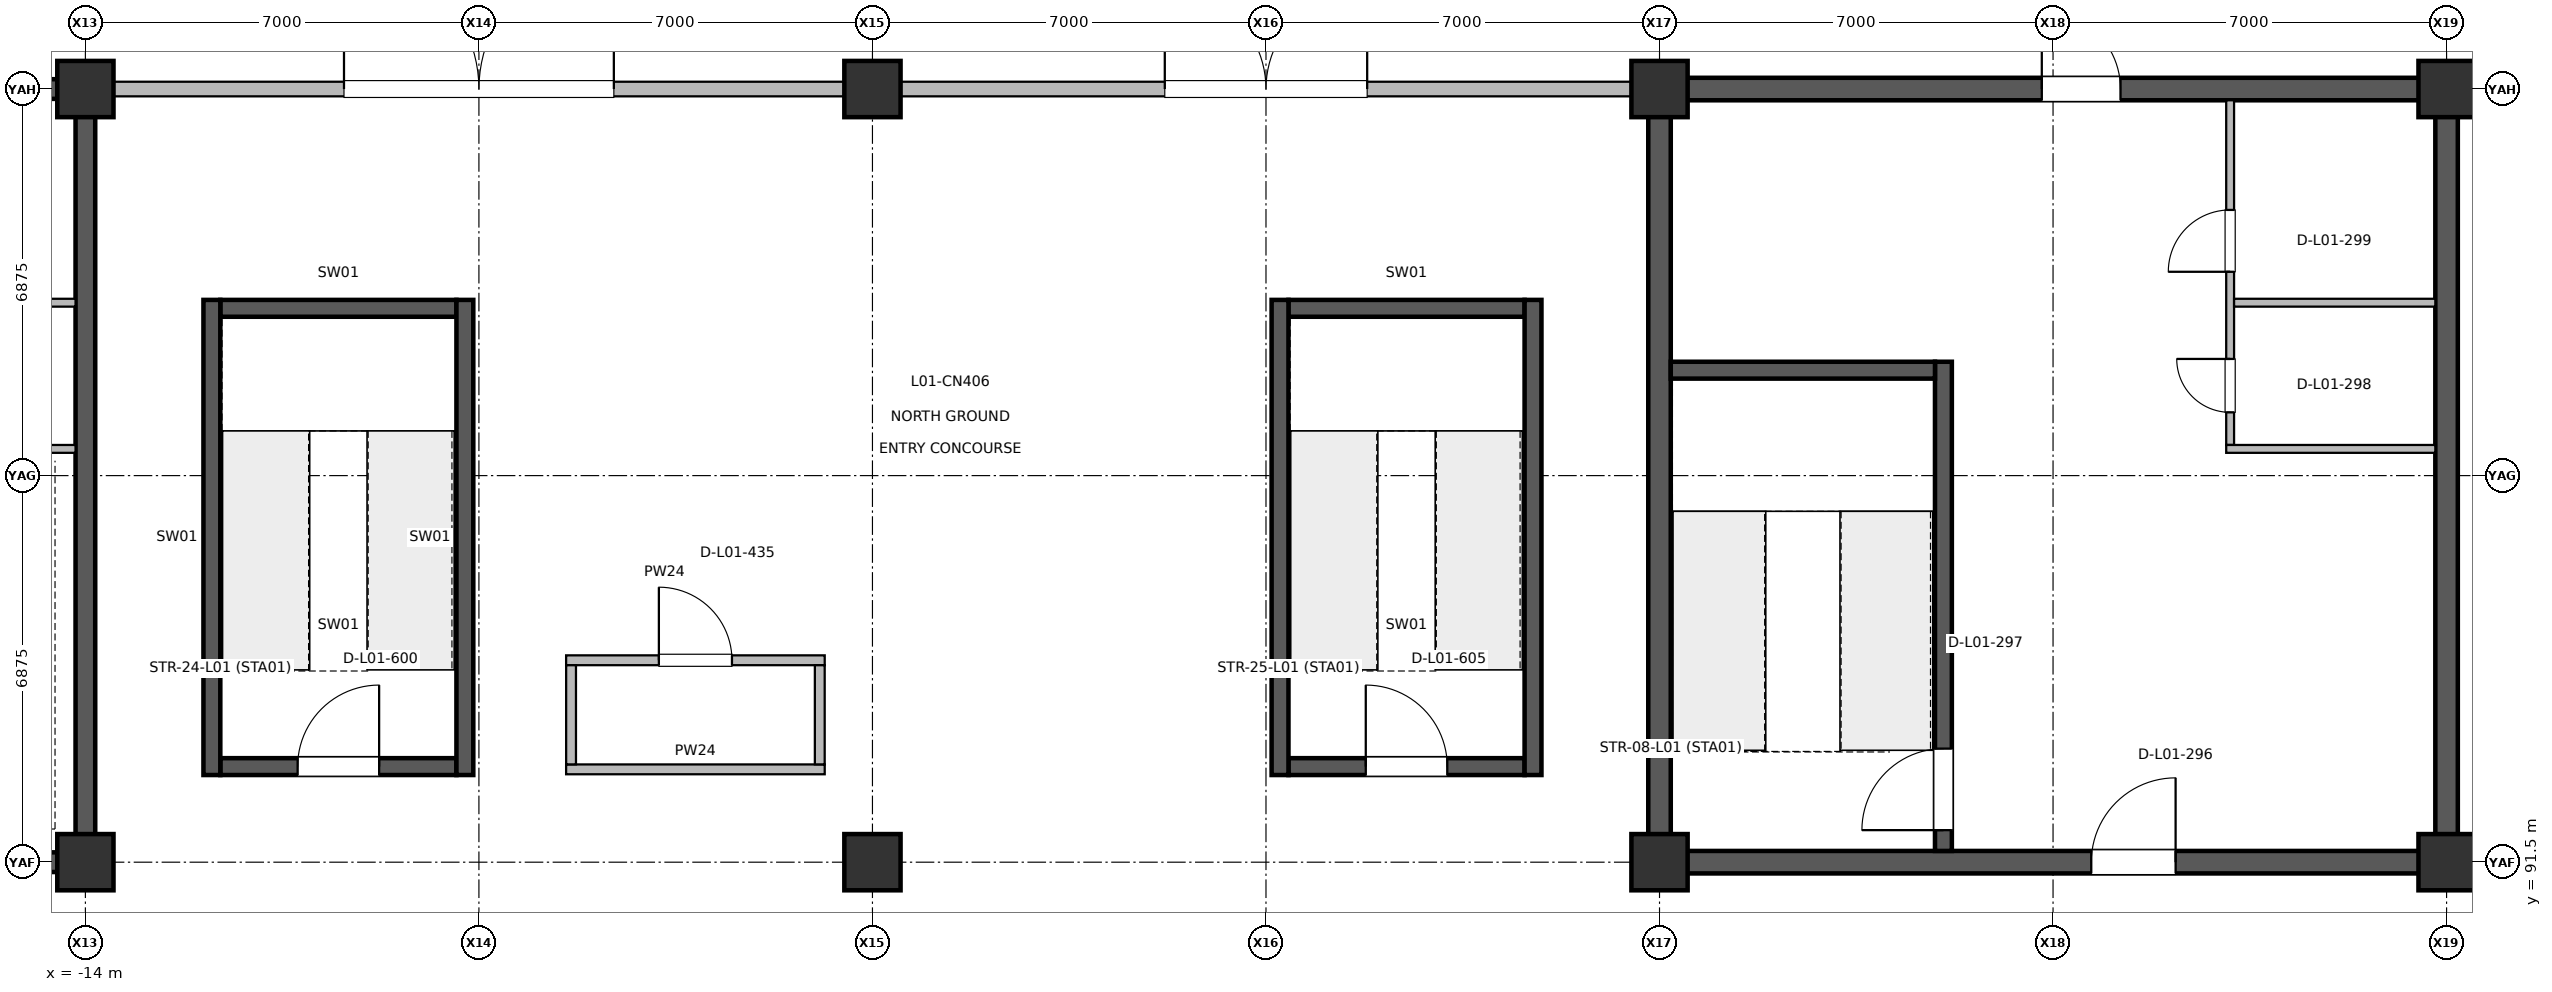
"""IFC4 building model, lengths in metres.
Left out: names, types, materials, properties, quantities, classifications, styles, units other than length and angle.
Written with IfcOpenShell. Run it as: python <this file> out.ifc"""

import sys

from ifc_helpers import new_model, si_unit, direction, frame, frame_2d, origin, origin_2d, place, context, subcontext, project, spatial, rectangle, circle, extrude, element, fill, save


model = new_model("IFC4")
c1 = context("Model", 3, precision=1e-05, world=origin(), true_north=direction((0.0, 1.0)))
c2 = subcontext(c1, "Body", "Model", "MODEL_VIEW")
j1 = project(units=[si_unit("LENGTHUNIT", "METRE"), si_unit("PLANEANGLEUNIT", "RADIAN")], contexts=[c1])
p1 = place(None, origin())
s1 = spatial("IfcSite", under=j1, at=p1, CompositionType="ELEMENT")
p2 = place(p1, origin())
s2 = spatial("IfcBuilding", under=s1, at=p2, CompositionType="ELEMENT")
p3 = place(p2, origin())
s3 = spatial("IfcBuildingStorey", under=s2, at=p3, CompositionType="ELEMENT", Elevation=0.0)
for number, where, z_axis, x_axis in (
    (1, (-14.0, 91.5, 0.0), (0.0, 0.0, 1.0), (1.0, 0.0, 0.0)),
    (2, (-14.0, 105.25, 0.0), (0.0, 0.0, 1.0), (1.0, 0.0, 0.0)),
    (3, (0.0, 91.5, 0.0), (0.0, 0.0, 1.0), (1.0, 0.0, 0.0)),
    (4, (0.0, 105.25, 0.0), (0.0, 0.0, 1.0), (1.0, 0.0, 0.0)),
    (5, (14.0, 91.5, 0.0), (0.0, 0.0, 1.0), (1.0, 0.0, 0.0)),
    (6, (14.0, 105.25, 0.0), (0.0, 0.0, 1.0), (1.0, 0.0, 0.0)),
    (7, (28.0, 91.5, 0.0), (0.0, 0.0, 1.0), (1.0, 0.0, 0.0)),
    (8, (28.0, 105.25, 0.0), (0.0, 0.0, 1.0), (1.0, 0.0, 0.0)),
):
    element("IfcColumn", number, at=place(p3, frame(where, z_axis=z_axis, x_axis=x_axis)), inside=s3, PredefinedType="COLUMN", context=c2, shape_type="SweptSolid", body=[
        extrude(circle(Radius=0.5, at=origin_2d()), origin(), (0.0, 0.0, 1.0), 5.998),
    ])
p4 = place(p3, frame((-14.0, 91.675, 0.0), z_axis=(0.0, 0.0, 1.0), x_axis=(0.0, 1.0, 0.0)))
e9 = element("IfcWall", 9, at=p4, inside=s3, PredefinedType="SHEAR", context=c2, shape_type="SweptSolid", body=[
    extrude(rectangle(XDim=13.4, YDim=0.35, at=frame_2d((6.7, 0.0))), origin(), (0.0, 0.0, 1.0), 5.78),
])
p5 = place(p3, frame((-27.825, 91.5, 0.0), z_axis=(0.0, 0.0, 1.0), x_axis=(1.0, 0.0, 0.0)))
e10 = element("IfcWall", 10, at=p5, inside=s3, PredefinedType="SHEAR", context=c2, shape_type="SweptSolid", body=[
    extrude(rectangle(XDim=13.65, YDim=0.35, at=frame_2d((6.825, 0.0))), origin(), (0.0, 0.0, 1.0), 5.78),
])
p6 = place(p5, frame((7.507, 0.0, 0.0)))
e11 = element("IfcOpeningElement", 11, at=p6, cuts=e10, PredefinedType="OPENING", context=c2, shape_type="SweptSolid", body=[
    extrude(rectangle(XDim=1.5, YDim=2.2, at=frame_2d((0.75, 1.1))), frame((0.0, 0.185, 0.0), z_axis=(0.0, -1.0, 0.0), x_axis=(1.0, 0.0, 0.0)), (0.0, 0.0, 1.0), 0.37),
])
p7 = place(p3, frame((-27.825, 105.25, 0.0), z_axis=(0.0, 0.0, 1.0), x_axis=(1.0, 0.0, 0.0)))
e12 = element("IfcWall", 12, at=p7, inside=s3, PredefinedType="SHEAR", context=c2, shape_type="SweptSolid", body=[
    extrude(rectangle(XDim=13.65, YDim=0.35, at=frame_2d((6.825, 0.0))), origin(), (0.0, 0.0, 1.0), 5.78),
])
p8 = place(p7, frame((6.6, 0.0, 0.0)))
e13 = element("IfcOpeningElement", 13, at=p8, cuts=e12, PredefinedType="OPENING", context=c2, shape_type="SweptSolid", body=[
    extrude(rectangle(XDim=1.4, YDim=2.2, at=frame_2d((0.7, 1.1))), frame((0.0, 0.185, 0.0), z_axis=(0.0, -1.0, 0.0), x_axis=(1.0, 0.0, 0.0)), (0.0, 0.0, 1.0), 0.37),
])
for number, where, z_axis, x_axis in (
    (14, (14.0, 91.7, 0.0), (0.0, 0.0, 1.0), (0.0, 1.0, 0.0)),
    (15, (28.0, 91.7, 0.0), (0.0, 0.0, 1.0), (0.0, 1.0, 0.0)),
):
    element("IfcWall", number, at=place(p3, frame(where, z_axis=z_axis, x_axis=x_axis)), inside=s3, PredefinedType="SHEAR", context=c2, shape_type="SweptSolid", body=[
        extrude(rectangle(XDim=13.35, YDim=0.4, at=frame_2d((6.675, 0.0))), origin(), (0.0, 0.0, 1.0), 5.78),
    ])
p9 = place(p3, frame((14.2, 91.5, 0.0), z_axis=(0.0, 0.0, 1.0), x_axis=(1.0, 0.0, 0.0)))
e16 = element("IfcWall", 16, at=p9, inside=s3, PredefinedType="SHEAR", context=c2, shape_type="SweptSolid", body=[
    extrude(rectangle(XDim=13.6, YDim=0.4, at=frame_2d((6.8, 0.0))), origin(), (0.0, 0.0, 1.0), 5.78),
])
p10 = place(p9, frame((7.48, 0.0, 0.0)))
e17 = element("IfcOpeningElement", 17, at=p10, cuts=e16, PredefinedType="OPENING", context=c2, shape_type="SweptSolid", body=[
    extrude(rectangle(XDim=1.5, YDim=2.2, at=frame_2d((0.75, 1.1))), frame((0.0, 0.21, 0.0), z_axis=(0.0, -1.0, 0.0), x_axis=(1.0, 0.0, 0.0)), (0.0, 0.0, 1.0), 0.42),
])
p11 = place(p3, frame((14.2, 105.25, 0.0), z_axis=(0.0, 0.0, 1.0), x_axis=(1.0, 0.0, 0.0)))
e18 = element("IfcWall", 18, at=p11, inside=s3, PredefinedType="SHEAR", context=c2, shape_type="SweptSolid", body=[
    extrude(rectangle(XDim=13.6, YDim=0.4, at=frame_2d((6.8, 0.0))), origin(), (0.0, 0.0, 1.0), 5.78),
])
p12 = place(p11, frame((6.6, 0.0, 0.0)))
e19 = element("IfcOpeningElement", 19, at=p12, cuts=e18, PredefinedType="OPENING", context=c2, shape_type="SweptSolid", body=[
    extrude(rectangle(XDim=1.4, YDim=2.2, at=frame_2d((0.7, 1.1))), frame((0.0, 0.21, 0.0), z_axis=(0.0, -1.0, 0.0), x_axis=(1.0, 0.0, 0.0)), (0.0, 0.0, 1.0), 0.42),
])
p13 = place(p3, frame((-13.52, 105.25, 0.0), z_axis=(0.0, 0.0, 1.0), x_axis=(1.0, 0.0, 0.0)))
e20 = element("IfcWall", 20, at=p13, inside=s3, PredefinedType="SOLIDWALL", context=c2, shape_type="SweptSolid", body=[
    extrude(rectangle(XDim=13.04, YDim=0.26, at=frame_2d((6.52, 0.0))), origin(), (0.0, 0.0, 1.0), 4.655),
])
p14 = place(p13, frame((4.12, 0.0, 0.0)))
e21 = element("IfcOpeningElement", 21, at=p14, cuts=e20, PredefinedType="OPENING", context=c2, shape_type="SweptSolid", body=[
    extrude(rectangle(XDim=4.8, YDim=3.8, at=frame_2d((2.4, 1.9))), frame((0.0, 0.14, 0.0), z_axis=(0.0, -1.0, 0.0), x_axis=(1.0, 0.0, 0.0)), (0.0, 0.0, 1.0), 0.28),
])
p15 = place(p3, frame((0.48, 105.25, 0.0), z_axis=(0.0, 0.0, 1.0), x_axis=(1.0, 0.0, 0.0)))
e22 = element("IfcWall", 22, at=p15, inside=s3, PredefinedType="SOLIDWALL", context=c2, shape_type="SweptSolid", body=[
    extrude(rectangle(XDim=13.04, YDim=0.26, at=frame_2d((6.52, 0.0))), origin(), (0.0, 0.0, 1.0), 4.655),
])
p16 = place(p15, frame((4.72, 0.0, 0.0)))
e23 = element("IfcOpeningElement", 23, at=p16, cuts=e22, PredefinedType="OPENING", context=c2, shape_type="SweptSolid", body=[
    extrude(rectangle(XDim=3.6, YDim=2.75, at=frame_2d((1.8, 1.375))), frame((0.0, 0.14, 0.0), z_axis=(0.0, -1.0, 0.0), x_axis=(1.0, 0.0, 0.0)), (0.0, 0.0, 1.0), 0.28),
])
p17 = place(p3, frame((19.05, 91.7, 0.0), z_axis=(0.0, 0.0, 1.0), x_axis=(0.0, 1.0, 0.0)))
e24 = element("IfcWall", 24, at=p17, inside=s3, PredefinedType="SHEAR", context=c2, shape_type="SweptSolid", body=[
    extrude(rectangle(XDim=8.7, YDim=0.3, at=frame_2d((4.35, 0.0))), origin(), (0.0, 0.0, 1.0), 5.78),
])
p18 = place(p17, frame((0.37, 0.0, 0.0)))
e25 = element("IfcOpeningElement", 25, at=p18, cuts=e24, PredefinedType="OPENING", context=c2, shape_type="SweptSolid", body=[
    extrude(rectangle(XDim=1.45, YDim=2.2, at=frame_2d((0.725, 1.1))), frame((0.0, 0.16, 0.0), z_axis=(0.0, -1.0, 0.0), x_axis=(1.0, 0.0, 0.0)), (0.0, 0.0, 1.0), 0.32),
])
p19 = place(p3, frame((24.15, 98.92, 0.0), z_axis=(0.0, 0.0, 1.0), x_axis=(0.0, 1.0, 0.0)))
e26 = element("IfcWall", 26, at=p19, inside=s3, PredefinedType="PARTITIONING", context=c2, shape_type="SweptSolid", body=[
    extrude(rectangle(XDim=6.13, YDim=0.14, at=frame_2d((3.065, 0.0))), origin(), (0.0, 0.0, 1.0), 5.02),
])
p20 = place(p19, frame((0.58, 0.0, 0.0)))
e27 = element("IfcOpeningElement", 27, at=p20, cuts=e26, PredefinedType="OPENING", context=c2, shape_type="SweptSolid", body=[
    extrude(rectangle(XDim=0.95, YDim=2.15, at=frame_2d((0.475, 1.075))), frame((0.0, 0.08, 0.0), z_axis=(0.0, -1.0, 0.0), x_axis=(1.0, 0.0, 0.0)), (0.0, 0.0, 1.0), 0.16),
])
p21 = place(p19, frame((3.08, 0.0, 0.0)))
e28 = element("IfcOpeningElement", 28, at=p21, cuts=e26, PredefinedType="OPENING", context=c2, shape_type="SweptSolid", body=[
    extrude(rectangle(XDim=1.1, YDim=2.15, at=frame_2d((0.55, 1.075))), frame((0.0, 0.08, 0.0), z_axis=(0.0, -1.0, 0.0), x_axis=(1.0, 0.0, 0.0)), (0.0, 0.0, 1.0), 0.16),
])
p22 = place(p3, frame((-5.449, 95.091, 0.0), z_axis=(0.0, 0.0, 1.0), x_axis=(1.0, 0.0, 0.0)))
e29 = element("IfcWall", 29, at=p22, inside=s3, PredefinedType="PARTITIONING", context=c2, shape_type="SweptSolid", body=[
    extrude(rectangle(XDim=4.6, YDim=0.175, at=frame_2d((2.3, 0.0))), origin(), (0.0, 0.0, 1.0), 5.02),
])
p23 = place(p22, frame((1.65, 0.0, 0.0)))
e30 = element("IfcOpeningElement", 30, at=p23, cuts=e29, PredefinedType="OPENING", context=c2, shape_type="SweptSolid", body=[
    extrude(rectangle(XDim=1.3, YDim=2.3, at=frame_2d((0.65, 1.15))), frame((0.0, 0.097, 0.0), z_axis=(0.0, -1.0, 0.0), x_axis=(1.0, 0.0, 0.0)), (0.0, 0.0, 1.0), 0.195),
])
p24 = place(p3, frame((-17.92, 98.85, 0.0), z_axis=(0.0, 0.0, 1.0), x_axis=(1.0, 0.0, 0.0)))
e31 = element("IfcWall", 31, at=p24, inside=s3, PredefinedType="PARTITIONING", context=c2, shape_type="SweptSolid", body=[
    extrude(rectangle(XDim=3.745, YDim=0.14, at=frame_2d((1.873, 0.0))), origin(), (0.0, 0.0, 1.0), 5.02),
])
p25 = place(p3, frame((-17.78, 101.45, 0.0), z_axis=(0.0, 0.0, 1.0), x_axis=(1.0, 0.0, 0.0)))
e32 = element("IfcWall", 32, at=p25, inside=s3, PredefinedType="PARTITIONING", context=c2, shape_type="SweptSolid", body=[
    extrude(rectangle(XDim=3.605, YDim=0.14, at=frame_2d((1.802, 0.0))), origin(), (0.0, 0.0, 1.0), 5.02),
])
p26 = place(p3, frame((24.08, 98.85, 0.0), z_axis=(0.0, 0.0, 1.0), x_axis=(1.0, 0.0, 0.0)))
e33 = element("IfcWall", 33, at=p26, inside=s3, PredefinedType="PARTITIONING", context=c2, shape_type="SweptSolid", body=[
    extrude(rectangle(XDim=3.72, YDim=0.14, at=frame_2d((1.86, 0.0))), origin(), (0.0, 0.0, 1.0), 5.02),
])
p27 = place(p3, frame((24.22, 101.45, 0.0), z_axis=(0.0, 0.0, 1.0), x_axis=(1.0, 0.0, 0.0)))
e34 = element("IfcWall", 34, at=p27, inside=s3, PredefinedType="PARTITIONING", context=c2, shape_type="SweptSolid", body=[
    extrude(rectangle(XDim=3.58, YDim=0.14, at=frame_2d((1.79, 0.0))), origin(), (0.0, 0.0, 1.0), 5.02),
])
p28 = place(p3, frame((-5.449, 93.151, 0.0), z_axis=(0.0, 0.0, 1.0), x_axis=(1.0, 0.0, 0.0)))
e35 = element("IfcWall", 35, at=p28, inside=s3, PredefinedType="PARTITIONING", context=c2, shape_type="SweptSolid", body=[
    extrude(rectangle(XDim=4.6, YDim=0.175, at=frame_2d((2.3, 0.0))), origin(), (0.0, 0.0, 1.0), 5.02),
])
for number, where, z_axis, x_axis in (
    (36, (-5.361, 93.239, 0.0), (0.0, 0.0, 1.0), (0.0, 1.0, 0.0)),
    (37, (-0.937, 93.239, 0.0), (0.0, 0.0, 1.0), (0.0, 1.0, 0.0)),
):
    element("IfcWall", number, at=place(p3, frame(where, z_axis=z_axis, x_axis=x_axis)), inside=s3, PredefinedType="PARTITIONING", context=c2, shape_type="SweptSolid", body=[
        extrude(rectangle(XDim=1.764, YDim=0.175, at=frame_2d((0.882, 0.0))), origin(), (0.0, 0.0, 1.0), 5.02),
    ])
p29 = place(p3, frame((14.2, 100.25, 0.0), z_axis=(0.0, 0.0, 1.0), x_axis=(1.0, 0.0, 0.0)))
e38 = element("IfcWall", 38, at=p29, inside=s3, PredefinedType="SHEAR", context=c2, shape_type="SweptSolid", body=[
    extrude(rectangle(XDim=4.7, YDim=0.3, at=frame_2d((2.35, 0.0))), origin(), (0.0, 0.0, 1.0), 5.78),
])
p30 = place(p3, frame((-11.6, 93.2, 0.0), z_axis=(0.0, 0.0, 1.0), x_axis=(1.0, 0.0, 0.0)))
e39 = element("IfcWall", 39, at=p30, inside=s3, PredefinedType="SHEAR", context=c2, shape_type="SweptSolid", body=[
    extrude(rectangle(XDim=4.2, YDim=0.3, at=frame_2d((2.1, 0.0))), origin(), (0.0, 0.0, 1.0), 5.78),
])
p31 = place(p30, frame((1.375, 0.0, 0.0)))
e40 = element("IfcOpeningElement", 40, at=p31, cuts=e39, PredefinedType="OPENING", context=c2, shape_type="SweptSolid", body=[
    extrude(rectangle(XDim=1.45, YDim=2.2, at=frame_2d((0.725, 1.1))), frame((0.0, 0.16, 0.0), z_axis=(0.0, -1.0, 0.0), x_axis=(1.0, 0.0, 0.0)), (0.0, 0.0, 1.0), 0.32),
])
p32 = place(p3, frame((-11.6, 101.35, 0.0), z_axis=(0.0, 0.0, 1.0), x_axis=(1.0, 0.0, 0.0)))
e41 = element("IfcWall", 41, at=p32, inside=s3, PredefinedType="SHEAR", context=c2, shape_type="SweptSolid", body=[
    extrude(rectangle(XDim=4.2, YDim=0.3, at=frame_2d((2.1, 0.0))), origin(), (0.0, 0.0, 1.0), 5.78),
])
for number, where, z_axis, x_axis in (
    (42, (-11.75, 93.05, 0.0), (0.0, 0.0, 1.0), (0.0, 1.0, 0.0)),
    (43, (-7.25, 93.05, 0.0), (0.0, 0.0, 1.0), (0.0, 1.0, 0.0)),
):
    element("IfcWall", number, at=place(p3, frame(where, z_axis=z_axis, x_axis=x_axis)), inside=s3, PredefinedType="SHEAR", context=c2, shape_type="SweptSolid", body=[
        extrude(rectangle(XDim=8.45, YDim=0.3, at=frame_2d((4.225, 0.0))), origin(), (0.0, 0.0, 1.0), 5.78),
    ])
p33 = place(p3, frame((7.4, 93.2, 0.0), z_axis=(0.0, 0.0, 1.0), x_axis=(1.0, 0.0, 0.0)))
e44 = element("IfcWall", 44, at=p33, inside=s3, PredefinedType="SHEAR", context=c2, shape_type="SweptSolid", body=[
    extrude(rectangle(XDim=4.2, YDim=0.3, at=frame_2d((2.1, 0.0))), origin(), (0.0, 0.0, 1.0), 5.78),
])
p34 = place(p33, frame((1.375, 0.0, 0.0)))
e45 = element("IfcOpeningElement", 45, at=p34, cuts=e44, PredefinedType="OPENING", context=c2, shape_type="SweptSolid", body=[
    extrude(rectangle(XDim=1.45, YDim=2.2, at=frame_2d((0.725, 1.1))), frame((0.0, 0.16, 0.0), z_axis=(0.0, -1.0, 0.0), x_axis=(1.0, 0.0, 0.0)), (0.0, 0.0, 1.0), 0.32),
])
p35 = place(p3, frame((7.4, 101.35, 0.0), z_axis=(0.0, 0.0, 1.0), x_axis=(1.0, 0.0, 0.0)))
e46 = element("IfcWall", 46, at=p35, inside=s3, PredefinedType="SHEAR", context=c2, shape_type="SweptSolid", body=[
    extrude(rectangle(XDim=4.2, YDim=0.3, at=frame_2d((2.1, 0.0))), origin(), (0.0, 0.0, 1.0), 5.78),
])
for number, where, z_axis, x_axis in (
    (47, (7.25, 93.05, 0.0), (0.0, 0.0, 1.0), (0.0, 1.0, 0.0)),
    (48, (11.75, 93.05, 0.0), (0.0, 0.0, 1.0), (0.0, 1.0, 0.0)),
):
    element("IfcWall", number, at=place(p3, frame(where, z_axis=z_axis, x_axis=x_axis)), inside=s3, PredefinedType="SHEAR", context=c2, shape_type="SweptSolid", body=[
        extrude(rectangle(XDim=8.45, YDim=0.3, at=frame_2d((4.225, 0.0))), origin(), (0.0, 0.0, 1.0), 5.78),
    ])
p36 = place(p12, origin())
e49 = element("IfcDoor", 49, at=p36, inside=s3, OperationType="SINGLE_SWING_LEFT", PredefinedType="DOOR", context=c2, shape_type="SweptSolid", body=[
    extrude(rectangle(XDim=1.4, YDim=2.2, at=frame_2d((0.7, 1.1))), frame((0.0, 0.025, 0.0), z_axis=(0.0, -1.0, 0.0), x_axis=(1.0, 0.0, 0.0)), (0.0, 0.0, 1.0), 0.05),
])
fill(e19, e49)
p37 = place(p14, origin())
e50 = element("IfcDoor", 50, at=p37, inside=s3, OperationType="DOUBLE_DOOR_SINGLE_SWING", PredefinedType="DOOR", context=c2, shape_type="SweptSolid", body=[
    extrude(rectangle(XDim=4.8, YDim=3.8, at=frame_2d((2.4, 1.9))), frame((0.0, 0.025, 0.0), z_axis=(0.0, -1.0, 0.0), x_axis=(1.0, 0.0, 0.0)), (0.0, 0.0, 1.0), 0.05),
])
fill(e21, e50)
p38 = place(p16, origin())
e51 = element("IfcDoor", 51, at=p38, inside=s3, OperationType="DOUBLE_DOOR_SINGLE_SWING", PredefinedType="DOOR", context=c2, shape_type="SweptSolid", body=[
    extrude(rectangle(XDim=3.6, YDim=2.75, at=frame_2d((1.8, 1.375))), frame((0.0, 0.025, 0.0), z_axis=(0.0, -1.0, 0.0), x_axis=(1.0, 0.0, 0.0)), (0.0, 0.0, 1.0), 0.05),
])
fill(e23, e51)
p39 = place(p10, origin())
e52 = element("IfcDoor", 52, at=p39, inside=s3, OperationType="SINGLE_SWING_RIGHT", PredefinedType="DOOR", context=c2, shape_type="SweptSolid", body=[
    extrude(rectangle(XDim=1.5, YDim=2.2, at=frame_2d((0.75, 1.1))), frame((0.0, 0.025, 0.0), z_axis=(0.0, -1.0, 0.0), x_axis=(1.0, 0.0, 0.0)), (0.0, 0.0, 1.0), 0.05),
])
fill(e17, e52)
p40 = place(p18, origin())
e53 = element("IfcDoor", 53, at=p40, inside=s3, OperationType="SINGLE_SWING_LEFT", PredefinedType="DOOR", context=c2, shape_type="SweptSolid", body=[
    extrude(rectangle(XDim=1.45, YDim=2.2, at=frame_2d((0.725, 1.1))), frame((0.0, 0.025, 0.0), z_axis=(0.0, -1.0, 0.0), x_axis=(1.0, 0.0, 0.0)), (0.0, 0.0, 1.0), 0.05),
])
fill(e25, e53)
p41 = place(p20, origin())
e54 = element("IfcDoor", 54, at=p41, inside=s3, OperationType="SINGLE_SWING_RIGHT", PredefinedType="DOOR", context=c2, shape_type="SweptSolid", body=[
    extrude(rectangle(XDim=0.95, YDim=2.15, at=frame_2d((0.475, 1.075))), frame((0.0, 0.025, 0.0), z_axis=(0.0, -1.0, 0.0), x_axis=(1.0, 0.0, 0.0)), (0.0, 0.0, 1.0), 0.05),
])
fill(e27, e54)
p42 = place(p21, origin())
e55 = element("IfcDoor", 55, at=p42, inside=s3, OperationType="SINGLE_SWING_LEFT", PredefinedType="DOOR", context=c2, shape_type="SweptSolid", body=[
    extrude(rectangle(XDim=1.1, YDim=2.15, at=frame_2d((0.55, 1.075))), frame((0.0, 0.025, 0.0), z_axis=(0.0, -1.0, 0.0), x_axis=(1.0, 0.0, 0.0)), (0.0, 0.0, 1.0), 0.05),
])
fill(e28, e55)
p43 = place(p23, origin())
e56 = element("IfcDoor", 56, at=p43, inside=s3, OperationType="SINGLE_SWING_LEFT", PredefinedType="DOOR", context=c2, shape_type="SweptSolid", body=[
    extrude(rectangle(XDim=1.3, YDim=2.3, at=frame_2d((0.65, 1.15))), frame((0.0, 0.025, 0.0), z_axis=(0.0, -1.0, 0.0), x_axis=(1.0, 0.0, 0.0)), (0.0, 0.0, 1.0), 0.05),
])
fill(e30, e56)
p44 = place(p31, origin())
e57 = element("IfcDoor", 57, at=p44, inside=s3, OperationType="SINGLE_SWING_RIGHT", PredefinedType="DOOR", context=c2, shape_type="SweptSolid", body=[
    extrude(rectangle(XDim=1.45, YDim=2.2, at=frame_2d((0.725, 1.1))), frame((0.0, 0.025, 0.0), z_axis=(0.0, -1.0, 0.0), x_axis=(1.0, 0.0, 0.0)), (0.0, 0.0, 1.0), 0.05),
])
fill(e40, e57)
p45 = place(p34, origin())
e58 = element("IfcDoor", 58, at=p45, inside=s3, OperationType="SINGLE_SWING_LEFT", PredefinedType="DOOR", context=c2, shape_type="SweptSolid", body=[
    extrude(rectangle(XDim=1.45, YDim=2.2, at=frame_2d((0.725, 1.1))), frame((0.0, 0.025, 0.0), z_axis=(0.0, -1.0, 0.0), x_axis=(1.0, 0.0, 0.0)), (0.0, 0.0, 1.0), 0.05),
])
fill(e45, e58)
save(model, sys.argv[1])
